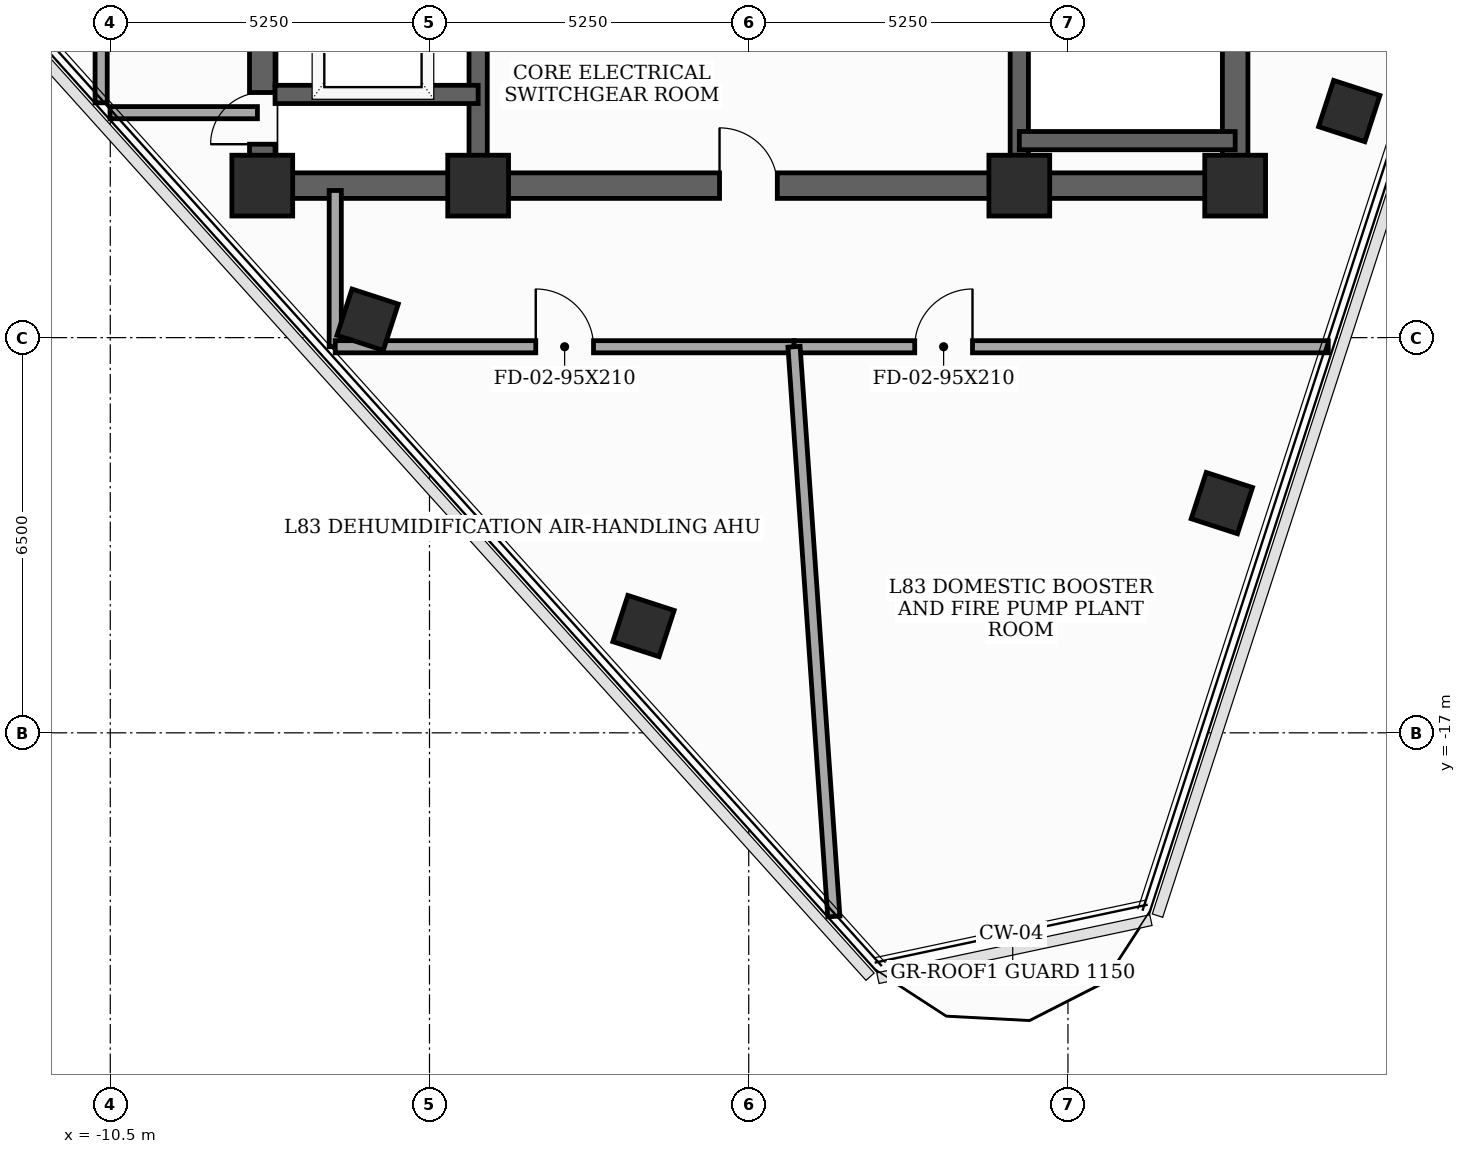
"""IFC4 building model, lengths in metres.
Left out: names, types, materials, properties, quantities, classifications, styles, units other than length and angle.
Written with IfcOpenShell. Run it as: python <this file> out.ifc"""

import sys

from ifc_helpers import new_model, si_unit, direction, frame, frame_2d, origin, origin_2d, place, context, subcontext, project, spatial, rectangle, extrude, element, fill, save


model = new_model("IFC4")
c1 = context("Model", 3, precision=1e-05, world=origin(), true_north=direction((0.0, 1.0)))
c2 = subcontext(c1, "Body", "Model", "MODEL_VIEW")
j1 = project(units=[si_unit("LENGTHUNIT", "METRE"), si_unit("PLANEANGLEUNIT", "RADIAN")], contexts=[c1])
p1 = place(None, origin())
s1 = spatial("IfcSite", under=j1, at=p1, CompositionType="ELEMENT")
p2 = place(p1, origin())
s2 = spatial("IfcBuilding", under=s1, at=p2, CompositionType="ELEMENT")
p3 = place(p2, frame((0.0, 0.0, 322.0)))
s3 = spatial("IfcBuildingStorey", under=s2, at=p3, CompositionType="ELEMENT", Elevation=322.0)
for number, where, z_axis, x_axis in (
    (1, (-8.0, -8.0, 0.0), (0.0, 0.0, 1.0), (1.0, 0.0, 0.0)),
    (2, (-4.45, -8.0, 0.0), (0.0, 0.0, 1.0), (1.0, 0.0, 0.0)),
    (3, (4.45, -8.0, 0.0), (0.0, 0.0, 1.0), (1.0, 0.0, 0.0)),
    (4, (8.0, -8.0, 0.0), (0.0, 0.0, 1.0), (1.0, 0.0, 0.0)),
):
    element("IfcColumn", number, at=place(p3, frame(where, z_axis=z_axis, x_axis=x_axis)), inside=s3, PredefinedType="COLUMN", context=c2, shape_type="SweptSolid", body=[
        extrude(rectangle(XDim=1.0, YDim=1.0, at=origin_2d()), origin(), (0.0, 0.0, 1.0), 4.6),
    ])
for number, where, z_axis, x_axis in (
    (5, (7.781, -13.222, 0.0), (0.0, 0.0, 1.0), (0.309, 0.951, 0.0)),
    (6, (9.876, -6.773, 0.0), (0.0, 0.0, 1.0), (0.309, 0.951, 0.0)),
    (7, (-6.268, -10.205, 0.0), (0.0, 0.0, 1.0), (0.309, 0.951, 0.0)),
    (8, (-1.731, -15.243, 0.0), (0.0, 0.0, 1.0), (0.309, 0.951, 0.0)),
):
    element("IfcColumn", number, at=place(p3, frame(where, z_axis=z_axis, x_axis=x_axis)), inside=s3, PredefinedType="COLUMN", context=c2, shape_type="SweptSolid", body=[
        extrude(rectangle(XDim=0.8, YDim=0.8, at=origin_2d()), origin(), (0.0, 0.0, 1.0), 4.6),
    ])
p4 = place(p3, frame((-8.0, -8.0, 0.0), z_axis=(0.0, 0.0, 1.0), x_axis=(0.0, 1.0, 0.0)))
e9 = element("IfcWall", 9, at=p4, inside=s3, PredefinedType="SHEAR", context=c2, shape_type="SweptSolid", body=[
    extrude(rectangle(XDim=16.0, YDim=0.42, at=frame_2d((8.0, 0.0))), origin(), (0.0, 0.0, 1.0), 4.38),
])
p5 = place(p4, frame((0.681, 0.0, 0.0)))
e10 = element("IfcOpeningElement", 10, at=p5, cuts=e9, PredefinedType="OPENING", context=c2, shape_type="SweptSolid", body=[
    extrude(rectangle(XDim=0.85, YDim=2.02, at=frame_2d((0.425, 1.01))), frame((0.0, 0.22, 0.0), z_axis=(0.0, -1.0, 0.0), x_axis=(1.0, 0.0, 0.0)), (0.0, 0.0, 1.0), 0.44),
])
p6 = place(p4, frame((5.35, 0.0, 0.0)))
e11 = element("IfcOpeningElement", 11, at=p6, cuts=e9, PredefinedType="OPENING", context=c2, shape_type="SweptSolid", body=[
    extrude(rectangle(XDim=1.05, YDim=2.15, at=frame_2d((0.525, 1.075))), frame((0.0, 0.22, 0.0), z_axis=(0.0, -1.0, 0.0), x_axis=(1.0, 0.0, 0.0)), (0.0, 0.0, 1.0), 0.44),
])
p7 = place(p3, frame((8.0, -8.0, 0.0), z_axis=(0.0, 0.0, 1.0), x_axis=(0.0, 1.0, 0.0)))
e12 = element("IfcWall", 12, at=p7, inside=s3, PredefinedType="SHEAR", context=c2, shape_type="SweptSolid", body=[
    extrude(rectangle(XDim=16.0, YDim=0.42, at=frame_2d((8.0, 0.0))), origin(), (0.0, 0.0, 1.0), 4.38),
])
p8 = place(p7, frame((9.6, 0.0, 0.0)))
e13 = element("IfcOpeningElement", 13, at=p8, cuts=e12, PredefinedType="OPENING", context=c2, shape_type="SweptSolid", body=[
    extrude(rectangle(XDim=1.05, YDim=2.15, at=frame_2d((0.525, 1.075))), frame((0.0, 0.22, 0.0), z_axis=(0.0, -1.0, 0.0), x_axis=(1.0, 0.0, 0.0)), (0.0, 0.0, 1.0), 0.44),
])
p9 = place(p7, frame((14.469, 0.0, 0.0)))
e14 = element("IfcOpeningElement", 14, at=p9, cuts=e12, PredefinedType="OPENING", context=c2, shape_type="SweptSolid", body=[
    extrude(rectangle(XDim=0.85, YDim=2.02, at=frame_2d((0.425, 1.01))), frame((0.0, 0.22, 0.0), z_axis=(0.0, -1.0, 0.0), x_axis=(1.0, 0.0, 0.0)), (0.0, 0.0, 1.0), 0.44),
])
p10 = place(p3, frame((-8.0, -8.0, 0.0), z_axis=(0.0, 0.0, 1.0), x_axis=(1.0, 0.0, 0.0)))
e15 = element("IfcWall", 15, at=p10, inside=s3, PredefinedType="SHEAR", context=c2, shape_type="SweptSolid", body=[
    extrude(rectangle(XDim=16.0, YDim=0.42, at=frame_2d((8.0, 0.0))), origin(), (0.0, 0.0, 1.0), 4.38),
])
p11 = place(p10, frame((7.52, 0.0, 0.0)))
e16 = element("IfcOpeningElement", 16, at=p11, cuts=e15, PredefinedType="OPENING", context=c2, shape_type="SweptSolid", body=[
    extrude(rectangle(XDim=0.95, YDim=2.1, at=frame_2d((0.475, 1.05))), frame((0.0, 0.22, 0.0), z_axis=(0.0, -1.0, 0.0), x_axis=(1.0, 0.0, 0.0)), (0.0, 0.0, 1.0), 0.44),
])
for number, where, z_axis, x_axis in (
    (17, (-4.45, -7.79, 0.0), (0.0, 0.0, 1.0), (0.0, 1.0, 0.0)),
    (18, (4.45, -7.79, 0.0), (0.0, 0.0, 1.0), (0.0, 1.0, 0.0)),
):
    element("IfcWall", number, at=place(p3, frame(where, z_axis=z_axis, x_axis=x_axis)), inside=s3, PredefinedType="SHEAR", context=c2, shape_type="SweptSolid", body=[
        extrude(rectangle(XDim=15.58, YDim=0.3, at=frame_2d((7.79, 0.0))), origin(), (0.0, 0.0, 1.0), 4.38),
    ])
p12 = place(p3, frame((4.45, -7.26, 0.0), z_axis=(0.0, 0.0, 1.0), x_axis=(1.0, 0.0, 0.0)))
e19 = element("IfcWall", 19, at=p12, inside=s3, PredefinedType="SHEAR", context=c2, shape_type="SweptSolid", body=[
    extrude(rectangle(XDim=3.55, YDim=0.3, at=frame_2d((1.775, 0.0))), origin(), (0.0, 0.0, 1.0), 4.38),
])
p13 = place(p3, frame((-7.79, -6.5, 0.0), z_axis=(0.0, 0.0, 1.0), x_axis=(1.0, 0.0, 0.0)))
e20 = element("IfcWall", 20, at=p13, inside=s3, PredefinedType="SHEAR", context=c2, shape_type="SweptSolid", body=[
    extrude(rectangle(XDim=3.34, YDim=0.3, at=frame_2d((1.67, 0.0))), origin(), (0.0, 0.0, 1.0), 4.38),
])
p14 = place(p3, frame((-10.65, -0.745, 0.0), z_axis=(0.0, 0.0, 1.0), x_axis=(0.0, -1.0, 0.0)))
e21 = element("IfcWall", 21, at=p14, inside=s3, PredefinedType="SOLIDWALL", context=c2, shape_type="SweptSolid", body=[
    extrude(rectangle(XDim=5.893, YDim=0.2, at=frame_2d((2.946, 0.0))), origin(), (0.0, 0.0, 1.0), 2.765),
])
p15 = place(p14, frame((1.175, 0.0, 0.0)))
e22 = element("IfcOpeningElement", 22, at=p15, cuts=e21, PredefinedType="OPENING", context=c2, shape_type="SweptSolid", body=[
    extrude(rectangle(XDim=0.95, YDim=2.1, at=frame_2d((0.475, 1.05))), frame((0.0, 0.11, 0.0), z_axis=(0.0, -1.0, 0.0), x_axis=(1.0, 0.0, 0.0)), (0.0, 0.0, 1.0), 0.22),
])
p16 = place(p3, frame((-10.504, -6.8, 0.0), z_axis=(0.0, 0.0, 1.0), x_axis=(1.0, 0.0, 0.0)))
e23 = element("IfcWall", 23, at=p16, inside=s3, PredefinedType="SOLIDWALL", context=c2, shape_type="SweptSolid", body=[
    extrude(rectangle(XDim=2.424, YDim=0.2, at=frame_2d((1.212, 0.0))), origin(), (0.0, 0.0, 1.0), 2.965),
])
p17 = place(p3, frame((-6.8, -8.08, 0.0), z_axis=(0.0, 0.0, 1.0), x_axis=(0.0, -1.0, 0.0)))
e24 = element("IfcWall", 24, at=p17, inside=s3, PredefinedType="SOLIDWALL", context=c2, shape_type="SweptSolid", body=[
    extrude(rectangle(XDim=2.57, YDim=0.2, at=frame_2d((1.285, 0.0))), origin(), (0.0, 0.0, 1.0), 2.965),
])
p18 = place(p3, frame((-6.8, -10.65, 0.0), z_axis=(0.0, 0.0, 1.0), x_axis=(1.0, 0.0, 0.0)))
e25 = element("IfcWall", 25, at=p18, inside=s3, PredefinedType="SOLIDWALL", context=c2, shape_type="SweptSolid", body=[
    extrude(rectangle(XDim=7.545, YDim=0.2, at=frame_2d((3.772, 0.0))), origin(), (0.0, 0.0, 1.0), 2.965),
])
p19 = place(p18, frame((3.298, 0.0, 0.0)))
e26 = element("IfcOpeningElement", 26, at=p19, cuts=e25, PredefinedType="OPENING", context=c2, shape_type="SweptSolid", body=[
    extrude(rectangle(XDim=0.95, YDim=2.1, at=frame_2d((0.475, 1.05))), frame((0.0, 0.11, 0.0), z_axis=(0.0, -1.0, 0.0), x_axis=(1.0, 0.0, 0.0)), (0.0, 0.0, 1.0), 0.22),
])
p20 = place(p3, frame((0.745, -10.65, 0.0), z_axis=(0.0, 0.0, 1.0), x_axis=(1.0, 0.0, 0.0)))
e27 = element("IfcWall", 27, at=p20, inside=s3, PredefinedType="SOLIDWALL", context=c2, shape_type="SweptSolid", body=[
    extrude(rectangle(XDim=8.786, YDim=0.2, at=frame_2d((4.393, 0.0))), origin(), (0.0, 0.0, 1.0), 2.965),
])
p21 = place(p20, frame((1.985, 0.0, 0.0)))
e28 = element("IfcOpeningElement", 28, at=p21, cuts=e27, PredefinedType="OPENING", context=c2, shape_type="SweptSolid", body=[
    extrude(rectangle(XDim=0.95, YDim=2.1, at=frame_2d((0.475, 1.05))), frame((0.0, 0.11, 0.0), z_axis=(0.0, -1.0, 0.0), x_axis=(1.0, 0.0, 0.0)), (0.0, 0.0, 1.0), 0.22),
])
p22 = place(p3, frame((1.399, -20.02, 0.0), z_axis=(0.0, 0.0, 1.0), x_axis=(-0.069656610199, 0.997571028376, 0.0)))
e29 = element("IfcWall", 29, at=p22, inside=s3, PredefinedType="SOLIDWALL", context=c2, shape_type="SweptSolid", body=[
    extrude(rectangle(XDim=9.393, YDim=0.2, at=frame_2d((4.697, 0.0))), origin(), (0.0, 0.0, 1.0), 2.965),
])
p23 = place(p5, origin())
e30 = element("IfcDoor", 30, at=p23, inside=s3, OperationType="SINGLE_SWING_LEFT", PredefinedType="TRAPDOOR", context=c2, shape_type="SweptSolid", body=[
    extrude(rectangle(XDim=0.85, YDim=2.02, at=frame_2d((0.425, 1.01))), frame((0.0, 0.025, 0.0), z_axis=(0.0, -1.0, 0.0), x_axis=(1.0, 0.0, 0.0)), (0.0, 0.0, 1.0), 0.05),
])
fill(e10, e30)
p24 = place(p11, origin())
e31 = element("IfcDoor", 31, at=p24, inside=s3, OperationType="SINGLE_SWING_LEFT", PredefinedType="DOOR", context=c2, shape_type="SweptSolid", body=[
    extrude(rectangle(XDim=0.95, YDim=2.1, at=frame_2d((0.475, 1.05))), frame((0.0, 0.025, 0.0), z_axis=(0.0, -1.0, 0.0), x_axis=(1.0, 0.0, 0.0)), (0.0, 0.0, 1.0), 0.05),
])
fill(e16, e31)
p25 = place(p19, origin())
e32 = element("IfcDoor", 32, at=p25, inside=s3, OperationType="SINGLE_SWING_LEFT", PredefinedType="DOOR", context=c2, shape_type="SweptSolid", body=[
    extrude(rectangle(XDim=0.95, YDim=2.1, at=frame_2d((0.475, 1.05))), frame((0.0, 0.025, 0.0), z_axis=(0.0, -1.0, 0.0), x_axis=(1.0, 0.0, 0.0)), (0.0, 0.0, 1.0), 0.05),
])
fill(e26, e32)
p26 = place(p21, origin())
e33 = element("IfcDoor", 33, at=p26, inside=s3, OperationType="SINGLE_SWING_RIGHT", PredefinedType="DOOR", context=c2, shape_type="SweptSolid", body=[
    extrude(rectangle(XDim=0.95, YDim=2.1, at=frame_2d((0.475, 1.05))), frame((0.0, 0.025, 0.0), z_axis=(0.0, -1.0, 0.0), x_axis=(1.0, 0.0, 0.0)), (0.0, 0.0, 1.0), 0.05),
])
fill(e28, e33)
save(model, sys.argv[1])
